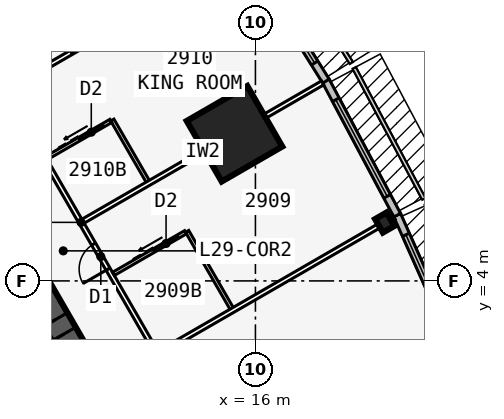
"""IFC4 building model, lengths in metres.
Left out: names, types, materials, properties, quantities, classifications, styles, units other than length and angle.
Written with IfcOpenShell. Run it as: python <this file> out.ifc"""

import sys

from ifc_helpers import new_model, si_unit, direction, frame, frame_2d, origin, origin_2d, place, context, subcontext, project, spatial, rectangle, i_section, extrude, element, fill, save


model = new_model("IFC4")
c1 = context("Model", 3, precision=1e-05, world=origin(), true_north=direction((0.0, 1.0)))
c2 = subcontext(c1, "Body", "Model", "MODEL_VIEW")
j1 = project(units=[si_unit("LENGTHUNIT", "METRE"), si_unit("PLANEANGLEUNIT", "RADIAN")], contexts=[c1])
p1 = place(None, origin())
s1 = spatial("IfcSite", under=j1, at=p1, CompositionType="ELEMENT")
p2 = place(p1, origin())
s2 = spatial("IfcBuilding", under=s1, at=p2, CompositionType="ELEMENT")
p3 = place(p2, frame((0.0, 0.0, 114.7)))
s3 = spatial("IfcBuildingStorey", under=s2, at=p3, CompositionType="ELEMENT", Elevation=114.7)
p4 = place(p3, frame((16.5, -9.526, 0.0), z_axis=(0.0, 0.0, 1.0), x_axis=(-0.499999749417, 0.866025548458, 0.0)))
e1 = element("IfcWall", 1, at=p4, inside=s3, PredefinedType="SHEAR", context=c2, shape_type="SweptSolid", body=[
    extrude(rectangle(XDim=33.0, YDim=0.9, at=frame_2d((16.5, 0.0))), origin(), (0.0, 0.0, 1.0), 3.4),
])
p5 = place(p4, frame((14.15, 0.0, 0.0)))
e2 = element("IfcOpeningElement", 2, at=p5, cuts=e1, PredefinedType="OPENING", context=c2, shape_type="SweptSolid", body=[
    extrude(rectangle(XDim=1.8, YDim=2.13, at=frame_2d((0.9, 1.065))), frame((0.0, 0.46, 0.0), z_axis=(0.0, -1.0, 0.0), x_axis=(1.0, 0.0, 0.0)), (0.0, 0.0, 1.0), 0.92),
])
p6 = place(p4, frame((12.6, 0.0, 0.0)))
e3 = element("IfcOpeningElement", 3, at=p6, cuts=e1, PredefinedType="OPENING", context=c2, shape_type="SweptSolid", body=[
    extrude(rectangle(XDim=1.0, YDim=2.13, at=frame_2d((0.5, 1.065))), frame((0.0, 0.46, 0.0), z_axis=(0.0, -1.0, 0.0), x_axis=(1.0, 0.0, 0.0)), (0.0, 0.0, 1.0), 0.92),
])
p7 = place(p3, frame((20.254, 5.92, 0.0), z_axis=(0.0, 0.0, 1.0), x_axis=(0.866025403784, 0.5, 0.0)))
e4 = element("IfcColumn", 4, at=p7, inside=s3, PredefinedType="COLUMN", context=c2, shape_type="SweptSolid", body=[
    extrude(i_section(OverallWidth=0.437, OverallDepth=0.513, WebThickness=0.061, FlangeThickness=0.097, at=origin_2d()), origin(), (0.0, 0.0, 1.0), 3.4),
])
p8 = place(p3, frame((15.312, 8.84, 0.0), z_axis=(0.0, 0.0, 1.0), x_axis=(0.866025403784, 0.5, 0.0)))
e5 = element("IfcColumn", 5, at=p8, inside=s3, PredefinedType="COLUMN", context=c2, shape_type="SweptSolid", body=[
    extrude(rectangle(XDim=2.3, YDim=2.3, at=origin_2d()), origin(), (0.0, 0.0, 1.0), 3.4),
])
p9 = place(p3, frame((22.705, 1.576, 0.0), z_axis=(0.0, 0.0, 1.0), x_axis=(-0.406832200364, 0.913502906808, 0.0)))
e6 = element("IfcWall", 6, at=p9, inside=s3, PredefinedType="STANDARD", context=c2, shape_type="SweptSolid", body=[
    extrude(rectangle(XDim=5.028, YDim=0.25, at=frame_2d((2.514, 0.0))), origin(), (0.0, 0.0, 1.0), 3.235),
])
p10 = place(p9, frame((0.714, 0.0, 0.45)))
e7 = element("IfcOpeningElement", 7, at=p10, cuts=e6, PredefinedType="OPENING", context=c2, shape_type="SweptSolid", body=[
    extrude(rectangle(XDim=3.6, YDim=2.4, at=frame_2d((1.8, 1.2))), frame((0.0, 0.135, 0.0), z_axis=(0.0, -1.0, 0.0), x_axis=(1.0, 0.0, 0.0)), (0.0, 0.0, 1.0), 0.27),
])
p11 = place(p3, frame((20.663, 6.161, 0.0), z_axis=(0.0, 0.0, 1.0), x_axis=(-0.469404966864, 0.882982999317, 0.0)))
e8 = element("IfcWall", 8, at=p11, inside=s3, PredefinedType="STANDARD", context=c2, shape_type="SweptSolid", body=[
    extrude(rectangle(XDim=5.003, YDim=0.25, at=frame_2d((2.501, 0.0))), origin(), (0.0, 0.0, 1.0), 3.235),
])
p12 = place(p11, frame((0.701, 0.0, 0.45)))
e9 = element("IfcOpeningElement", 9, at=p12, cuts=e8, PredefinedType="OPENING", context=c2, shape_type="SweptSolid", body=[
    extrude(rectangle(XDim=3.6, YDim=2.4, at=frame_2d((1.8, 1.2))), frame((0.0, 0.135, 0.0), z_axis=(0.0, -1.0, 0.0), x_axis=(1.0, 0.0, 0.0)), (0.0, 0.0, 1.0), 0.27),
])
p13 = place(p3, frame((18.319, 10.571, 0.0), z_axis=(0.0, 0.0, 1.0), x_axis=(-0.529990167382, 0.84800378683, 0.0)))
e10 = element("IfcWall", 10, at=p13, inside=s3, PredefinedType="STANDARD", context=c2, shape_type="SweptSolid", body=[
    extrude(rectangle(XDim=5.003, YDim=0.25, at=frame_2d((2.501, 0.0))), origin(), (0.0, 0.0, 1.0), 3.235),
])
p14 = place(p13, frame((0.701, 0.0, 0.45)))
e11 = element("IfcOpeningElement", 11, at=p14, cuts=e10, PredefinedType="OPENING", context=c2, shape_type="SweptSolid", body=[
    extrude(rectangle(XDim=3.6, YDim=2.4, at=frame_2d((1.8, 1.2))), frame((0.0, 0.135, 0.0), z_axis=(0.0, -1.0, 0.0), x_axis=(1.0, 0.0, 0.0)), (0.0, 0.0, 1.0), 0.27),
])
p15 = place(p3, frame((20.027, -10.985, 0.0), z_axis=(0.0, 0.0, 1.0), x_axis=(-0.500001677587, 0.866024435227, 0.0)))
e12 = element("IfcWall", 12, at=p15, inside=s3, PredefinedType="PARTITIONING", context=c2, shape_type="SweptSolid", body=[
    extrude(rectangle(XDim=39.054, YDim=0.15, at=frame_2d((19.527, 0.0))), origin(), (0.0, 0.0, 1.0), 3.235),
])
p16 = place(p15, frame((0.352, 0.0, 0.0)))
e13 = element("IfcOpeningElement", 13, at=p16, cuts=e12, PredefinedType="OPENING", context=c2, shape_type="SweptSolid", body=[
    extrude(rectangle(XDim=0.95, YDim=2.13, at=frame_2d((0.475, 1.065))), frame((0.0, 0.085, 0.0), z_axis=(0.0, -1.0, 0.0), x_axis=(1.0, 0.0, 0.0)), (0.0, 0.0, 1.0), 0.17),
])
p17 = place(p15, frame((7.752, 0.0, 0.0)))
e14 = element("IfcOpeningElement", 14, at=p17, cuts=e12, PredefinedType="OPENING", context=c2, shape_type="SweptSolid", body=[
    extrude(rectangle(XDim=0.95, YDim=2.13, at=frame_2d((0.475, 1.065))), frame((0.0, 0.085, 0.0), z_axis=(0.0, -1.0, 0.0), x_axis=(1.0, 0.0, 0.0)), (0.0, 0.0, 1.0), 0.17),
])
p18 = place(p15, frame((17.752, 0.0, 0.0)))
e15 = element("IfcOpeningElement", 15, at=p18, cuts=e12, PredefinedType="OPENING", context=c2, shape_type="SweptSolid", body=[
    extrude(rectangle(XDim=0.95, YDim=2.13, at=frame_2d((0.475, 1.065))), frame((0.0, 0.085, 0.0), z_axis=(0.0, -1.0, 0.0), x_axis=(1.0, 0.0, 0.0)), (0.0, 0.0, 1.0), 0.17),
])
p19 = place(p15, frame((22.152, 0.0, 0.0)))
e16 = element("IfcOpeningElement", 16, at=p19, cuts=e12, PredefinedType="OPENING", context=c2, shape_type="SweptSolid", body=[
    extrude(rectangle(XDim=0.95, YDim=2.13, at=frame_2d((0.475, 1.065))), frame((0.0, 0.085, 0.0), z_axis=(0.0, -1.0, 0.0), x_axis=(1.0, 0.0, 0.0)), (0.0, 0.0, 1.0), 0.17),
])
p20 = place(p15, frame((27.152, 0.0, 0.0)))
e17 = element("IfcOpeningElement", 17, at=p20, cuts=e12, PredefinedType="OPENING", context=c2, shape_type="SweptSolid", body=[
    extrude(rectangle(XDim=0.95, YDim=2.13, at=frame_2d((0.475, 1.065))), frame((0.0, 0.085, 0.0), z_axis=(0.0, -1.0, 0.0), x_axis=(1.0, 0.0, 0.0)), (0.0, 0.0, 1.0), 0.17),
])
p21 = place(p15, frame((36.546, 0.0, 0.0)))
e18 = element("IfcOpeningElement", 18, at=p21, cuts=e12, PredefinedType="OPENING", context=c2, shape_type="SweptSolid", body=[
    extrude(rectangle(XDim=0.95, YDim=2.13, at=frame_2d((0.475, 1.065))), frame((0.0, 0.085, 0.0), z_axis=(0.0, -1.0, 0.0), x_axis=(1.0, 0.0, 0.0)), (0.0, 0.0, 1.0), 0.17),
])
p22 = place(p3, frame((12.829, 1.633, 0.0), z_axis=(0.0, 0.0, 1.0), x_axis=(0.866027015393, 0.499997208602, 0.0)))
e19 = element("IfcWall", 19, at=p22, inside=s3, PredefinedType="PARTITIONING", context=c2, shape_type="SweptSolid", body=[
    extrude(rectangle(XDim=8.922, YDim=0.15, at=frame_2d((4.461, 0.0))), origin(), (0.0, 0.0, 1.0), 2.389),
])
p23 = place(p3, frame((10.329, 5.963, 0.0), z_axis=(0.0, 0.0, 1.0), x_axis=(0.866025170687, 0.500000403736, 0.0)))
e20 = element("IfcWall", 20, at=p23, inside=s3, PredefinedType="PARTITIONING", context=c2, shape_type="SweptSolid", body=[
    extrude(rectangle(XDim=9.099, YDim=0.15, at=frame_2d((4.549, 0.0))), origin(), (0.0, 0.0, 1.0), 2.389),
])
p24 = place(p3, frame((7.829, 10.293, 0.0), z_axis=(0.0, 0.0, 1.0), x_axis=(0.866027015393, 0.499997208602, 0.0)))
e21 = element("IfcWall", 21, at=p24, inside=s3, PredefinedType="PARTITIONING", context=c2, shape_type="SweptSolid", body=[
    extrude(rectangle(XDim=8.922, YDim=0.15, at=frame_2d((4.461, 0.0))), origin(), (0.0, 0.0, 1.0), 2.389),
])
p25 = place(p3, frame((15.253, 3.033, 0.0), z_axis=(0.0, 0.0, 1.0), x_axis=(-0.499990139034, 0.866031096941, 0.0)))
e22 = element("IfcWall", 22, at=p25, inside=s3, PredefinedType="PLUMBINGWALL", context=c2, shape_type="SweptSolid", body=[
    extrude(rectangle(XDim=3.0, YDim=0.12, at=frame_2d((1.5, 0.0))), origin(), (0.0, 0.0, 1.0), 3.235),
])
p26 = place(p3, frame((11.329, 4.231, 0.0), z_axis=(0.0, 0.0, 1.0), x_axis=(0.866035715982, 0.499982138324, 0.0)))
e23 = element("IfcWall", 23, at=p26, inside=s3, PredefinedType="PLUMBINGWALL", context=c2, shape_type="SweptSolid", body=[
    extrude(rectangle(XDim=2.74, YDim=0.12, at=frame_2d((1.37, 0.0))), origin(), (0.0, 0.0, 1.0), 3.235),
])
p27 = place(p26, frame((1.55, 0.0, 0.0)))
e24 = element("IfcOpeningElement", 24, at=p27, cuts=e23, PredefinedType="OPENING", context=c2, shape_type="SweptSolid", body=[
    extrude(rectangle(XDim=0.9, YDim=2.13, at=frame_2d((0.45, 1.065))), frame((0.0, 0.07, 0.0), z_axis=(0.0, -1.0, 0.0), x_axis=(1.0, 0.0, 0.0)), (0.0, 0.0, 1.0), 0.14),
])
p28 = place(p3, frame((12.493, 7.213, 0.0), z_axis=(0.0, 0.0, 1.0), x_axis=(-0.500001309137, 0.866024647952, 0.0)))
e25 = element("IfcWall", 25, at=p28, inside=s3, PredefinedType="PLUMBINGWALL", context=c2, shape_type="SweptSolid", body=[
    extrude(rectangle(XDim=2.4, YDim=0.12, at=frame_2d((1.2, 0.0))), origin(), (0.0, 0.0, 1.0), 3.235),
])
p29 = place(p3, frame((9.128, 8.042, 0.0), z_axis=(0.0, 0.0, 1.0), x_axis=(0.866005645448, 0.500034220881, 0.0)))
e26 = element("IfcWall", 26, at=p29, inside=s3, PredefinedType="PLUMBINGWALL", context=c2, shape_type="SweptSolid", body=[
    extrude(rectangle(XDim=2.44, YDim=0.12, at=frame_2d((1.22, 0.0))), origin(), (0.0, 0.0, 1.0), 3.235),
])
p30 = place(p29, frame((1.25, 0.0, 0.0)))
e27 = element("IfcOpeningElement", 27, at=p30, cuts=e26, PredefinedType="OPENING", context=c2, shape_type="SweptSolid", body=[
    extrude(rectangle(XDim=0.9, YDim=2.13, at=frame_2d((0.45, 1.065))), frame((0.0, 0.07, 0.0), z_axis=(0.0, -1.0, 0.0), x_axis=(1.0, 0.0, 0.0)), (0.0, 0.0, 1.0), 0.14),
])
p31 = place(p10, origin())
e28 = element("IfcWindow", 28, at=p31, inside=s3, PartitioningType="SINGLE_PANEL", PredefinedType="WINDOW", context=c2, shape_type="SweptSolid", body=[
    extrude(rectangle(XDim=3.6, YDim=2.4, at=frame_2d((1.8, 1.2))), frame((0.0, 0.03, 0.0), z_axis=(0.0, -1.0, 0.0), x_axis=(1.0, 0.0, 0.0)), (0.0, 0.0, 1.0), 0.06),
])
fill(e7, e28)
p32 = place(p12, origin())
e29 = element("IfcWindow", 29, at=p32, inside=s3, PartitioningType="SINGLE_PANEL", PredefinedType="WINDOW", context=c2, shape_type="SweptSolid", body=[
    extrude(rectangle(XDim=3.6, YDim=2.4, at=frame_2d((1.8, 1.2))), frame((0.0, 0.03, 0.0), z_axis=(0.0, -1.0, 0.0), x_axis=(1.0, 0.0, 0.0)), (0.0, 0.0, 1.0), 0.06),
])
fill(e9, e29)
p33 = place(p14, origin())
e30 = element("IfcWindow", 30, at=p33, inside=s3, PartitioningType="SINGLE_PANEL", PredefinedType="WINDOW", context=c2, shape_type="SweptSolid", body=[
    extrude(rectangle(XDim=3.6, YDim=2.4, at=frame_2d((1.8, 1.2))), frame((0.0, 0.03, 0.0), z_axis=(0.0, -1.0, 0.0), x_axis=(1.0, 0.0, 0.0)), (0.0, 0.0, 1.0), 0.06),
])
fill(e11, e30)
p34 = place(p27, origin())
e31 = element("IfcDoor", 31, at=p34, inside=s3, OperationType="SLIDING_TO_LEFT", PredefinedType="DOOR", context=c2, shape_type="SweptSolid", body=[
    extrude(rectangle(XDim=0.9, YDim=2.13, at=frame_2d((0.45, 1.065))), frame((0.0, 0.025, 0.0), z_axis=(0.0, -1.0, 0.0), x_axis=(1.0, 0.0, 0.0)), (0.0, 0.0, 1.0), 0.05),
])
fill(e24, e31)
p35 = place(p18, origin())
e32 = element("IfcDoor", 32, at=p35, inside=s3, OperationType="SINGLE_SWING_LEFT", PredefinedType="DOOR", context=c2, shape_type="SweptSolid", body=[
    extrude(rectangle(XDim=0.95, YDim=2.13, at=frame_2d((0.475, 1.065))), frame((0.0, 0.025, 0.0), z_axis=(0.0, -1.0, 0.0), x_axis=(1.0, 0.0, 0.0)), (0.0, 0.0, 1.0), 0.05),
])
fill(e15, e32)
p36 = place(p30, origin())
e33 = element("IfcDoor", 33, at=p36, inside=s3, OperationType="SLIDING_TO_LEFT", PredefinedType="DOOR", context=c2, shape_type="SweptSolid", body=[
    extrude(rectangle(XDim=0.9, YDim=2.13, at=frame_2d((0.45, 1.065))), frame((0.0, 0.025, 0.0), z_axis=(0.0, -1.0, 0.0), x_axis=(1.0, 0.0, 0.0)), (0.0, 0.0, 1.0), 0.05),
])
fill(e27, e33)
p37 = place(p5, origin())
e34 = element("IfcDoor", 34, at=p37, inside=s3, OperationType="DOUBLE_DOOR_SINGLE_SWING", PredefinedType="DOOR", context=c2, shape_type="SweptSolid", body=[
    extrude(rectangle(XDim=1.8, YDim=2.13, at=frame_2d((0.9, 1.065))), frame((0.0, 0.025, 0.0), z_axis=(0.0, -1.0, 0.0), x_axis=(1.0, 0.0, 0.0)), (0.0, 0.0, 1.0), 0.05),
])
fill(e2, e34)
p38 = place(p6, origin())
e35 = element("IfcDoor", 35, at=p38, inside=s3, OperationType="SINGLE_SWING_RIGHT", PredefinedType="DOOR", context=c2, shape_type="SweptSolid", body=[
    extrude(rectangle(XDim=1.0, YDim=2.13, at=frame_2d((0.5, 1.065))), frame((0.0, 0.025, 0.0), z_axis=(0.0, -1.0, 0.0), x_axis=(1.0, 0.0, 0.0)), (0.0, 0.0, 1.0), 0.05),
])
fill(e3, e35)
save(model, sys.argv[1])
